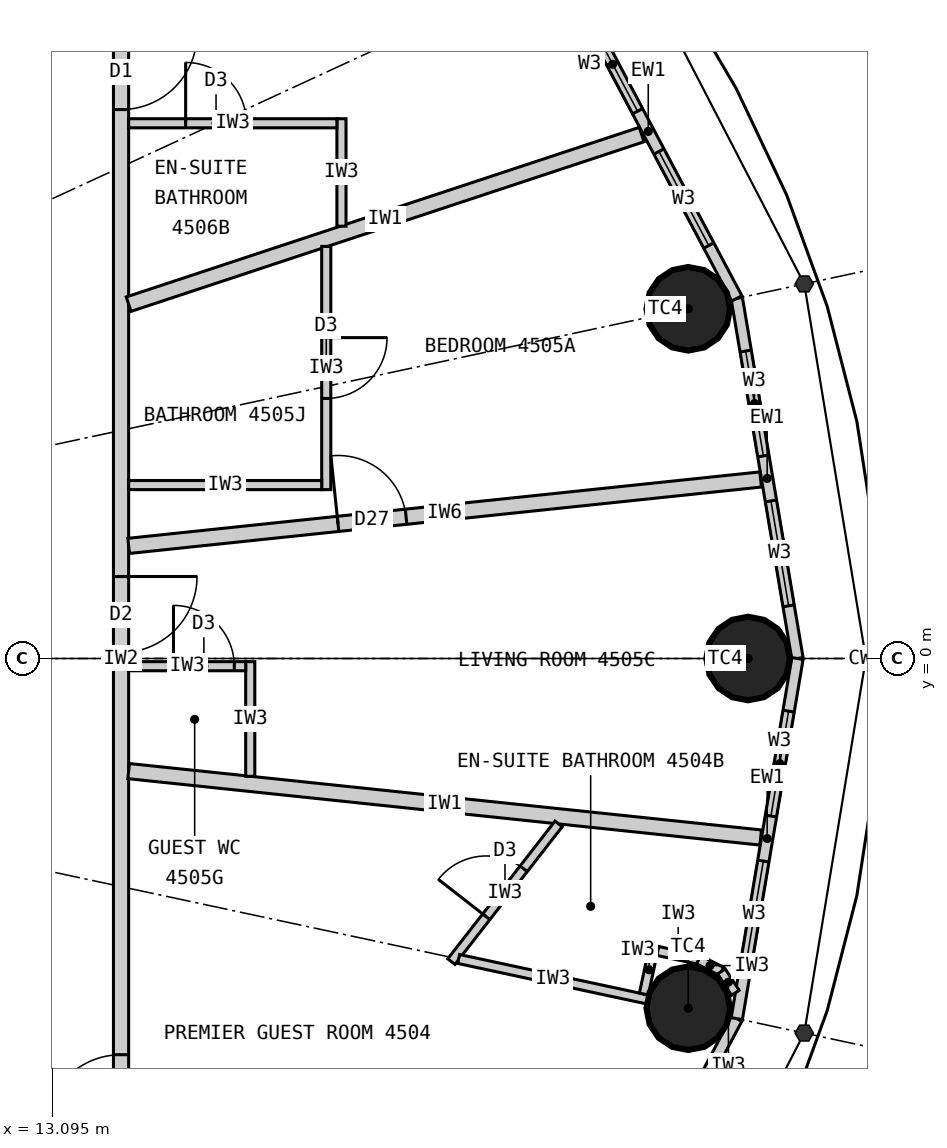
"""IFC4 building model, lengths in metres.
Left out: names, types, materials, properties, quantities, classifications, styles, units other than length and angle.
Written with IfcOpenShell. Run it as: python <this file> out.ifc"""

import sys

from ifc_helpers import new_model, si_unit, direction, frame, frame_2d, origin, origin_2d, place, context, subcontext, project, spatial, rectangle, circle, extrude, element, fill, save


model = new_model("IFC4")
c1 = context("Model", 3, precision=1e-05, world=origin(), true_north=direction((0.0, 1.0)))
c2 = subcontext(c1, "Body", "Model", "MODEL_VIEW")
j1 = project(units=[si_unit("LENGTHUNIT", "METRE"), si_unit("PLANEANGLEUNIT", "RADIAN")], contexts=[c1])
p1 = place(None, origin())
s1 = spatial("IfcSite", under=j1, at=p1, CompositionType="ELEMENT")
p2 = place(p1, origin())
s2 = spatial("IfcBuilding", under=s1, at=p2, CompositionType="ELEMENT")
p3 = place(p2, frame((0.0, 0.0, 169.8)))
s3 = spatial("IfcBuildingStorey", under=s2, at=p3, CompositionType="ELEMENT", Elevation=169.8)
for number, where, z_axis, x_axis in (
    (1, (22.25, 0.0, 0.0), (0.0, 0.0, 1.0), (1.0, 0.0, 0.0)),
    (2, (21.463, 4.601, 0.0), (0.0, 0.0, 1.0), (1.0, 0.0, 0.0)),
    (3, (21.463, -4.601, 0.0), (0.0, 0.0, 1.0), (1.0, 0.0, 0.0)),
):
    element("IfcColumn", number, at=place(p3, frame(where, z_axis=z_axis, x_axis=x_axis)), inside=s3, PredefinedType="COLUMN", context=c2, shape_type="SweptSolid", body=[
        extrude(circle(Radius=0.55, at=origin_2d()), origin(), (0.0, 0.0, 1.0), 3.3),
    ])
p4 = place(p3, frame((22.9, 0.0, 0.0), z_axis=(0.0, 0.0, 1.0), x_axis=(-0.166162111254, 0.986098449843, 0.0)))
e4 = element("IfcWall", 4, at=p4, inside=s3, PredefinedType="ELEMENTEDWALL", context=c2, shape_type="SweptSolid", body=[
    extrude(rectangle(XDim=4.805, YDim=0.15, at=frame_2d((2.402, 0.0))), origin(), (0.0, 0.0, 1.0), 3.12),
])
p5 = place(p4, frame((0.702, 0.0, 0.9)))
e5 = element("IfcOpeningElement", 5, at=p5, cuts=e4, PredefinedType="OPENING", context=c2, shape_type="SweptSolid", body=[
    extrude(rectangle(XDim=1.4, YDim=1.9, at=frame_2d((0.7, 0.95))), frame((0.0, 0.085, 0.0), z_axis=(0.0, -1.0, 0.0), x_axis=(1.0, 0.0, 0.0)), (0.0, 0.0, 1.0), 0.17),
])
p6 = place(p4, frame((2.702, 0.0, 0.9)))
e6 = element("IfcOpeningElement", 6, at=p6, cuts=e4, PredefinedType="OPENING", context=c2, shape_type="SweptSolid", body=[
    extrude(rectangle(XDim=1.4, YDim=1.9, at=frame_2d((0.7, 0.95))), frame((0.0, 0.085, 0.0), z_axis=(0.0, -1.0, 0.0), x_axis=(1.0, 0.0, 0.0)), (0.0, 0.0, 1.0), 0.17),
])
p7 = place(p3, frame((22.102, 4.738, 0.0), z_axis=(0.0, 0.0, 1.0), x_axis=(-0.468428906714, 0.883501193748, 0.0)))
e7 = element("IfcWall", 7, at=p7, inside=s3, PredefinedType="ELEMENTEDWALL", context=c2, shape_type="SweptSolid", body=[
    extrude(rectangle(XDim=4.974, YDim=0.15, at=frame_2d((2.487, 0.0))), origin(), (0.0, 0.0, 1.0), 3.12),
])
p8 = place(p7, frame((0.787, 0.0, 0.9)))
e8 = element("IfcOpeningElement", 8, at=p8, cuts=e7, PredefinedType="OPENING", context=c2, shape_type="SweptSolid", body=[
    extrude(rectangle(XDim=1.4, YDim=1.9, at=frame_2d((0.7, 0.95))), frame((0.0, 0.085, 0.0), z_axis=(0.0, -1.0, 0.0), x_axis=(1.0, 0.0, 0.0)), (0.0, 0.0, 1.0), 0.17),
])
p9 = place(p7, frame((2.787, 0.0, 0.9)))
e9 = element("IfcOpeningElement", 9, at=p9, cuts=e7, PredefinedType="OPENING", context=c2, shape_type="SweptSolid", body=[
    extrude(rectangle(XDim=1.4, YDim=1.9, at=frame_2d((0.7, 0.95))), frame((0.0, 0.085, 0.0), z_axis=(0.0, -1.0, 0.0), x_axis=(1.0, 0.0, 0.0)), (0.0, 0.0, 1.0), 0.17),
])
p10 = place(p3, frame((19.772, -9.132, 0.0), z_axis=(0.0, 0.0, 1.0), x_axis=(0.468428906714, 0.883501193748, 0.0)))
e10 = element("IfcWall", 10, at=p10, inside=s3, PredefinedType="ELEMENTEDWALL", context=c2, shape_type="SweptSolid", body=[
    extrude(rectangle(XDim=4.974, YDim=0.15, at=frame_2d((2.487, 0.0))), origin(), (0.0, 0.0, 1.0), 3.12),
])
p11 = place(p10, frame((0.787, 0.0, 0.9)))
e11 = element("IfcOpeningElement", 11, at=p11, cuts=e10, PredefinedType="OPENING", context=c2, shape_type="SweptSolid", body=[
    extrude(rectangle(XDim=1.4, YDim=1.9, at=frame_2d((0.7, 0.95))), frame((0.0, 0.085, 0.0), z_axis=(0.0, -1.0, 0.0), x_axis=(1.0, 0.0, 0.0)), (0.0, 0.0, 1.0), 0.17),
])
p12 = place(p10, frame((2.787, 0.0, 0.9)))
e12 = element("IfcOpeningElement", 12, at=p12, cuts=e10, PredefinedType="OPENING", context=c2, shape_type="SweptSolid", body=[
    extrude(rectangle(XDim=1.4, YDim=1.9, at=frame_2d((0.7, 0.95))), frame((0.0, 0.085, 0.0), z_axis=(0.0, -1.0, 0.0), x_axis=(1.0, 0.0, 0.0)), (0.0, 0.0, 1.0), 0.17),
])
p13 = place(p3, frame((22.102, -4.738, 0.0), z_axis=(0.0, 0.0, 1.0), x_axis=(0.166162111254, 0.986098449843, 0.0)))
e13 = element("IfcWall", 13, at=p13, inside=s3, PredefinedType="ELEMENTEDWALL", context=c2, shape_type="SweptSolid", body=[
    extrude(rectangle(XDim=4.805, YDim=0.15, at=frame_2d((2.402, 0.0))), origin(), (0.0, 0.0, 1.0), 3.12),
])
p14 = place(p13, frame((0.702, 0.0, 0.9)))
e14 = element("IfcOpeningElement", 14, at=p14, cuts=e13, PredefinedType="OPENING", context=c2, shape_type="SweptSolid", body=[
    extrude(rectangle(XDim=1.4, YDim=1.9, at=frame_2d((0.7, 0.95))), frame((0.0, 0.085, 0.0), z_axis=(0.0, -1.0, 0.0), x_axis=(1.0, 0.0, 0.0)), (0.0, 0.0, 1.0), 0.17),
])
p15 = place(p13, frame((2.702, 0.0, 0.9)))
e15 = element("IfcOpeningElement", 15, at=p15, cuts=e13, PredefinedType="OPENING", context=c2, shape_type="SweptSolid", body=[
    extrude(rectangle(XDim=1.4, YDim=1.9, at=frame_2d((0.7, 0.95))), frame((0.0, 0.085, 0.0), z_axis=(0.0, -1.0, 0.0), x_axis=(1.0, 0.0, 0.0)), (0.0, 0.0, 1.0), 0.17),
])
p16 = place(p3, frame((14.0, -9.9, 0.0), z_axis=(0.0, 0.0, 1.0), x_axis=(0.0, 1.0, 0.0)))
e16 = element("IfcWall", 16, at=p16, inside=s3, PredefinedType="PARTITIONING", context=c2, shape_type="SweptSolid", body=[
    extrude(rectangle(XDim=19.8, YDim=0.2, at=frame_2d((9.9, 0.0))), origin(), (0.0, 0.0, 1.0), 3.12),
])
p17 = place(p16, frame((3.688, 0.0, 0.0)))
e17 = element("IfcOpeningElement", 17, at=p17, cuts=e16, PredefinedType="OPENING", context=c2, shape_type="SweptSolid", body=[
    extrude(rectangle(XDim=1.0, YDim=2.2, at=frame_2d((0.5, 1.1))), frame((0.0, 0.11, 0.0), z_axis=(0.0, -1.0, 0.0), x_axis=(1.0, 0.0, 0.0)), (0.0, 0.0, 1.0), 0.22),
])
p18 = place(p16, frame((9.979, 0.0, 0.0)))
e18 = element("IfcOpeningElement", 18, at=p18, cuts=e16, PredefinedType="OPENING", context=c2, shape_type="SweptSolid", body=[
    extrude(rectangle(XDim=1.0, YDim=2.2, at=frame_2d((0.5, 1.1))), frame((0.0, 0.11, 0.0), z_axis=(0.0, -1.0, 0.0), x_axis=(1.0, 0.0, 0.0)), (0.0, 0.0, 1.0), 0.22),
])
p19 = place(p16, frame((17.122, 0.0, 0.0)))
e19 = element("IfcOpeningElement", 19, at=p19, cuts=e16, PredefinedType="OPENING", context=c2, shape_type="SweptSolid", body=[
    extrude(rectangle(XDim=1.0, YDim=2.2, at=frame_2d((0.5, 1.1))), frame((0.0, 0.11, 0.0), z_axis=(0.0, -1.0, 0.0), x_axis=(1.0, 0.0, 0.0)), (0.0, 0.0, 1.0), 0.22),
])
p20 = place(p3, frame((14.1, 1.481, 0.0), z_axis=(0.0, 0.0, 1.0), x_axis=(0.994524794819, 0.104500873159, 0.0)))
e20 = element("IfcWall", 20, at=p20, inside=s3, PredefinedType="PARTITIONING", context=c2, shape_type="SweptSolid", body=[
    extrude(rectangle(XDim=8.362, YDim=0.2, at=frame_2d((4.181, 0.0))), origin(), (0.0, 0.0, 1.0), 2.47),
])
p21 = place(p20, frame((2.77, 0.0, 0.0)))
e21 = element("IfcOpeningElement", 21, at=p21, cuts=e20, PredefinedType="OPENING", context=c2, shape_type="SweptSolid", body=[
    extrude(rectangle(XDim=0.9, YDim=2.1, at=frame_2d((0.45, 1.05))), frame((0.0, 0.11, 0.0), z_axis=(0.0, -1.0, 0.0), x_axis=(1.0, 0.0, 0.0)), (0.0, 0.0, 1.0), 0.22),
])
p22 = place(p3, frame((14.1, 4.661, 0.0), z_axis=(0.0, 0.0, 1.0), x_axis=(0.949453216399, 0.313908569285, 0.0)))
e22 = element("IfcWall", 22, at=p22, inside=s3, PredefinedType="PARTITIONING", context=c2, shape_type="SweptSolid", body=[
    extrude(rectangle(XDim=7.109, YDim=0.2, at=frame_2d((3.554, 0.0))), origin(), (0.0, 0.0, 1.0), 3.12),
])
p23 = place(p3, frame((14.1, -1.481, 0.0), z_axis=(0.0, 0.0, 1.0), x_axis=(0.994524794819, -0.104500873159, 0.0)))
e23 = element("IfcWall", 23, at=p23, inside=s3, PredefinedType="PARTITIONING", context=c2, shape_type="SweptSolid", body=[
    extrude(rectangle(XDim=8.362, YDim=0.2, at=frame_2d((4.181, 0.0))), origin(), (0.0, 0.0, 1.0), 2.47),
])
p24 = place(p3, frame((19.758, -2.177, 0.0), z_axis=(0.0, 0.0, 1.0), x_axis=(-0.614713147302, -0.788750750576, 0.0)))
e24 = element("IfcWall", 24, at=p24, inside=s3, PredefinedType="PARTITIONING", context=c2, shape_type="SweptSolid", body=[
    extrude(rectangle(XDim=2.296, YDim=0.12, at=frame_2d((1.148, 0.0))), origin(), (0.0, 0.0, 1.0), 3.12),
])
p25 = place(p24, frame((0.748, 0.0, 0.0)))
e25 = element("IfcOpeningElement", 25, at=p25, cuts=e24, PredefinedType="OPENING", context=c2, shape_type="SweptSolid", body=[
    extrude(rectangle(XDim=0.8, YDim=2.1, at=frame_2d((0.4, 1.05))), frame((0.0, 0.07, 0.0), z_axis=(0.0, -1.0, 0.0), x_axis=(1.0, 0.0, 0.0)), (0.0, 0.0, 1.0), 0.14),
])
p26 = place(p3, frame((18.441, -3.953, 0.0), z_axis=(0.0, 0.0, 1.0), x_axis=(0.977801007461, -0.209535652833, 0.0)))
e26 = element("IfcWall", 26, at=p26, inside=s3, PredefinedType="PARTITIONING", context=c2, shape_type="SweptSolid", body=[
    extrude(rectangle(XDim=2.54, YDim=0.12, at=frame_2d((1.27, 0.0))), origin(), (0.0, 0.0, 1.0), 2.42),
])
p27 = place(p3, frame((20.879, -4.414, 0.0), z_axis=(0.0, 0.0, 1.0), x_axis=(0.209554644104, 0.977796937577, 0.0)))
e27 = element("IfcWall", 27, at=p27, inside=s3, PredefinedType="PARTITIONING", context=c2, shape_type="SweptSolid", body=[
    extrude(rectangle(XDim=0.652, YDim=0.12, at=frame_2d((0.326, 0.0))), origin(), (0.0, 0.0, 1.0), 3.12),
])
p28 = place(p3, frame((21.062, -3.848, 0.0), z_axis=(0.0, 0.0, 1.0), x_axis=(0.977789415726, -0.209589738521, 0.0)))
e28 = element("IfcWall", 28, at=p28, inside=s3, PredefinedType="PARTITIONING", context=c2, shape_type="SweptSolid", body=[
    extrude(rectangle(XDim=0.55, YDim=0.12, at=frame_2d((0.275, 0.0))), origin(), (0.0, 0.0, 1.0), 3.12),
])
p29 = place(p3, frame((21.599, -3.963, 0.0), z_axis=(0.0, 0.0, 1.0), x_axis=(0.890193602875, -0.455582428766, 0.0)))
e29 = element("IfcWall", 29, at=p29, inside=s3, PredefinedType="PARTITIONING", context=c2, shape_type="SweptSolid", body=[
    extrude(rectangle(XDim=0.338, YDim=0.12, at=frame_2d((0.169, 0.0))), origin(), (0.0, 0.0, 1.0), 3.12),
])
p30 = place(p3, frame((21.9, -4.117, 0.0), z_axis=(0.0, 0.0, 1.0), x_axis=(0.543582688681, -0.839355622228, 0.0)))
e30 = element("IfcWall", 30, at=p30, inside=s3, PredefinedType="PARTITIONING", context=c2, shape_type="SweptSolid", body=[
    extrude(rectangle(XDim=0.336, YDim=0.12, at=frame_2d((0.168, 0.0))), origin(), (0.0, 0.0, 1.0), 3.12),
])
p31 = place(p3, frame((15.7, -1.55, 0.0), z_axis=(0.0, 0.0, 1.0), x_axis=(0.0, 1.0, 0.0)))
e31 = element("IfcWall", 31, at=p31, inside=s3, PredefinedType="PARTITIONING", context=c2, shape_type="SweptSolid", body=[
    extrude(rectangle(XDim=1.508, YDim=0.12, at=frame_2d((0.754, 0.0))), origin(), (0.0, 0.0, 1.0), 3.12),
])
p32 = place(p3, frame((14.1, -0.102, 0.0), z_axis=(0.0, 0.0, 1.0), x_axis=(1.0, 0.0, 0.0)))
e32 = element("IfcWall", 32, at=p32, inside=s3, PredefinedType="PARTITIONING", context=c2, shape_type="SweptSolid", body=[
    extrude(rectangle(XDim=1.54, YDim=0.12, at=frame_2d((0.77, 0.0))), origin(), (0.0, 0.0, 1.0), 2.42),
])
p33 = place(p32, frame((0.59, 0.0, 0.0)))
e33 = element("IfcOpeningElement", 33, at=p33, cuts=e32, PredefinedType="OPENING", context=c2, shape_type="SweptSolid", body=[
    extrude(rectangle(XDim=0.8, YDim=2.1, at=frame_2d((0.4, 1.05))), frame((0.0, 0.07, 0.0), z_axis=(0.0, -1.0, 0.0), x_axis=(1.0, 0.0, 0.0)), (0.0, 0.0, 1.0), 0.14),
])
p34 = place(p3, frame((16.7, 5.421, 0.0), z_axis=(0.0, 0.0, 1.0), x_axis=(0.0, -1.0, 0.0)))
e34 = element("IfcWall", 34, at=p34, inside=s3, PredefinedType="PARTITIONING", context=c2, shape_type="SweptSolid", body=[
    extrude(rectangle(XDim=3.2, YDim=0.12, at=frame_2d((1.6, 0.0))), origin(), (0.0, 0.0, 1.0), 3.12),
])
p35 = place(p34, frame((1.2, 0.0, 0.0)))
e35 = element("IfcOpeningElement", 35, at=p35, cuts=e34, PredefinedType="OPENING", context=c2, shape_type="SweptSolid", body=[
    extrude(rectangle(XDim=0.8, YDim=2.1, at=frame_2d((0.4, 1.05))), frame((0.0, 0.07, 0.0), z_axis=(0.0, -1.0, 0.0), x_axis=(1.0, 0.0, 0.0)), (0.0, 0.0, 1.0), 0.14),
])
p36 = place(p3, frame((14.1, 2.281, 0.0), z_axis=(0.0, 0.0, 1.0), x_axis=(1.0, 0.0, 0.0)))
e36 = element("IfcWall", 36, at=p36, inside=s3, PredefinedType="PARTITIONING", context=c2, shape_type="SweptSolid", body=[
    extrude(rectangle(XDim=2.54, YDim=0.12, at=frame_2d((1.27, 0.0))), origin(), (0.0, 0.0, 1.0), 3.12),
])
p37 = place(p3, frame((16.9, 5.687, 0.0), z_axis=(0.0, 0.0, 1.0), x_axis=(0.0, 1.0, 0.0)))
e37 = element("IfcWall", 37, at=p37, inside=s3, PredefinedType="PARTITIONING", context=c2, shape_type="SweptSolid", body=[
    extrude(rectangle(XDim=1.414, YDim=0.12, at=frame_2d((0.707, 0.0))), origin(), (0.0, 0.0, 1.0), 3.12),
])
p38 = place(p3, frame((14.1, 7.042, 0.0), z_axis=(0.0, 0.0, 1.0), x_axis=(1.0, 0.0, 0.0)))
e38 = element("IfcWall", 38, at=p38, inside=s3, PredefinedType="PARTITIONING", context=c2, shape_type="SweptSolid", body=[
    extrude(rectangle(XDim=2.74, YDim=0.12, at=frame_2d((1.37, 0.0))), origin(), (0.0, 0.0, 1.0), 3.12),
])
p39 = place(p38, frame((0.75, 0.0, 0.0)))
e39 = element("IfcOpeningElement", 39, at=p39, cuts=e38, PredefinedType="OPENING", context=c2, shape_type="SweptSolid", body=[
    extrude(rectangle(XDim=0.8, YDim=2.1, at=frame_2d((0.4, 1.05))), frame((0.0, 0.07, 0.0), z_axis=(0.0, -1.0, 0.0), x_axis=(1.0, 0.0, 0.0)), (0.0, 0.0, 1.0), 0.14),
])
p40 = place(p5, origin())
e40 = element("IfcWindow", 40, at=p40, inside=s3, PartitioningType="SINGLE_PANEL", PredefinedType="WINDOW", context=c2, shape_type="SweptSolid", body=[
    extrude(rectangle(XDim=1.4, YDim=1.9, at=frame_2d((0.7, 0.95))), frame((0.0, 0.03, 0.0), z_axis=(0.0, -1.0, 0.0), x_axis=(1.0, 0.0, 0.0)), (0.0, 0.0, 1.0), 0.06),
])
fill(e5, e40)
p41 = place(p6, origin())
e41 = element("IfcWindow", 41, at=p41, inside=s3, PartitioningType="SINGLE_PANEL", PredefinedType="WINDOW", context=c2, shape_type="SweptSolid", body=[
    extrude(rectangle(XDim=1.4, YDim=1.9, at=frame_2d((0.7, 0.95))), frame((0.0, 0.03, 0.0), z_axis=(0.0, -1.0, 0.0), x_axis=(1.0, 0.0, 0.0)), (0.0, 0.0, 1.0), 0.06),
])
fill(e6, e41)
p42 = place(p8, origin())
e42 = element("IfcWindow", 42, at=p42, inside=s3, PartitioningType="SINGLE_PANEL", PredefinedType="WINDOW", context=c2, shape_type="SweptSolid", body=[
    extrude(rectangle(XDim=1.4, YDim=1.9, at=frame_2d((0.7, 0.95))), frame((0.0, 0.03, 0.0), z_axis=(0.0, -1.0, 0.0), x_axis=(1.0, 0.0, 0.0)), (0.0, 0.0, 1.0), 0.06),
])
fill(e8, e42)
p43 = place(p9, origin())
e43 = element("IfcWindow", 43, at=p43, inside=s3, PartitioningType="SINGLE_PANEL", PredefinedType="WINDOW", context=c2, shape_type="SweptSolid", body=[
    extrude(rectangle(XDim=1.4, YDim=1.9, at=frame_2d((0.7, 0.95))), frame((0.0, 0.03, 0.0), z_axis=(0.0, -1.0, 0.0), x_axis=(1.0, 0.0, 0.0)), (0.0, 0.0, 1.0), 0.06),
])
fill(e9, e43)
p44 = place(p14, origin())
e44 = element("IfcWindow", 44, at=p44, inside=s3, PartitioningType="SINGLE_PANEL", PredefinedType="WINDOW", context=c2, shape_type="SweptSolid", body=[
    extrude(rectangle(XDim=1.4, YDim=1.9, at=frame_2d((0.7, 0.95))), frame((0.0, 0.03, 0.0), z_axis=(0.0, -1.0, 0.0), x_axis=(1.0, 0.0, 0.0)), (0.0, 0.0, 1.0), 0.06),
])
fill(e14, e44)
p45 = place(p15, origin())
e45 = element("IfcWindow", 45, at=p45, inside=s3, PartitioningType="SINGLE_PANEL", PredefinedType="WINDOW", context=c2, shape_type="SweptSolid", body=[
    extrude(rectangle(XDim=1.4, YDim=1.9, at=frame_2d((0.7, 0.95))), frame((0.0, 0.03, 0.0), z_axis=(0.0, -1.0, 0.0), x_axis=(1.0, 0.0, 0.0)), (0.0, 0.0, 1.0), 0.06),
])
fill(e15, e45)
p46 = place(p25, origin())
e46 = element("IfcDoor", 46, at=p46, inside=s3, OperationType="SINGLE_SWING_RIGHT", PredefinedType="DOOR", context=c2, shape_type="SweptSolid", body=[
    extrude(rectangle(XDim=0.8, YDim=2.1, at=frame_2d((0.4, 1.05))), frame((0.0, 0.025, 0.0), z_axis=(0.0, -1.0, 0.0), x_axis=(1.0, 0.0, 0.0)), (0.0, 0.0, 1.0), 0.05),
])
fill(e25, e46)
p47 = place(p17, origin())
e47 = element("IfcDoor", 47, at=p47, inside=s3, OperationType="SINGLE_SWING_LEFT", PredefinedType="DOOR", context=c2, shape_type="SweptSolid", body=[
    extrude(rectangle(XDim=1.0, YDim=2.2, at=frame_2d((0.5, 1.1))), frame((0.0, 0.025, 0.0), z_axis=(0.0, -1.0, 0.0), x_axis=(1.0, 0.0, 0.0)), (0.0, 0.0, 1.0), 0.05),
])
fill(e17, e47)
p48 = place(p33, origin())
e48 = element("IfcDoor", 48, at=p48, inside=s3, OperationType="SINGLE_SWING_LEFT", PredefinedType="DOOR", context=c2, shape_type="SweptSolid", body=[
    extrude(rectangle(XDim=0.8, YDim=2.1, at=frame_2d((0.4, 1.05))), frame((0.0, 0.025, 0.0), z_axis=(0.0, -1.0, 0.0), x_axis=(1.0, 0.0, 0.0)), (0.0, 0.0, 1.0), 0.05),
])
fill(e33, e48)
p49 = place(p18, origin())
e49 = element("IfcDoor", 49, at=p49, inside=s3, OperationType="SINGLE_SWING_RIGHT", PredefinedType="DOOR", context=c2, shape_type="SweptSolid", body=[
    extrude(rectangle(XDim=1.0, YDim=2.2, at=frame_2d((0.5, 1.1))), frame((0.0, 0.025, 0.0), z_axis=(0.0, -1.0, 0.0), x_axis=(1.0, 0.0, 0.0)), (0.0, 0.0, 1.0), 0.05),
])
fill(e18, e49)
p50 = place(p35, origin())
e50 = element("IfcDoor", 50, at=p50, inside=s3, OperationType="SINGLE_SWING_LEFT", PredefinedType="DOOR", context=c2, shape_type="SweptSolid", body=[
    extrude(rectangle(XDim=0.8, YDim=2.1, at=frame_2d((0.4, 1.05))), frame((0.0, 0.025, 0.0), z_axis=(0.0, -1.0, 0.0), x_axis=(1.0, 0.0, 0.0)), (0.0, 0.0, 1.0), 0.05),
])
fill(e35, e50)
p51 = place(p21, origin())
e51 = element("IfcDoor", 51, at=p51, inside=s3, OperationType="SINGLE_SWING_LEFT", PredefinedType="DOOR", context=c2, shape_type="SweptSolid", body=[
    extrude(rectangle(XDim=0.9, YDim=2.1, at=frame_2d((0.45, 1.05))), frame((0.0, 0.025, 0.0), z_axis=(0.0, -1.0, 0.0), x_axis=(1.0, 0.0, 0.0)), (0.0, 0.0, 1.0), 0.05),
])
fill(e21, e51)
p52 = place(p39, origin())
e52 = element("IfcDoor", 52, at=p52, inside=s3, OperationType="SINGLE_SWING_LEFT", PredefinedType="DOOR", context=c2, shape_type="SweptSolid", body=[
    extrude(rectangle(XDim=0.8, YDim=2.1, at=frame_2d((0.4, 1.05))), frame((0.0, 0.025, 0.0), z_axis=(0.0, -1.0, 0.0), x_axis=(1.0, 0.0, 0.0)), (0.0, 0.0, 1.0), 0.05),
])
fill(e39, e52)
p53 = place(p19, origin())
e53 = element("IfcDoor", 53, at=p53, inside=s3, OperationType="SINGLE_SWING_RIGHT", PredefinedType="DOOR", context=c2, shape_type="SweptSolid", body=[
    extrude(rectangle(XDim=1.0, YDim=2.2, at=frame_2d((0.5, 1.1))), frame((0.0, 0.025, 0.0), z_axis=(0.0, -1.0, 0.0), x_axis=(1.0, 0.0, 0.0)), (0.0, 0.0, 1.0), 0.05),
])
fill(e19, e53)
save(model, sys.argv[1])
